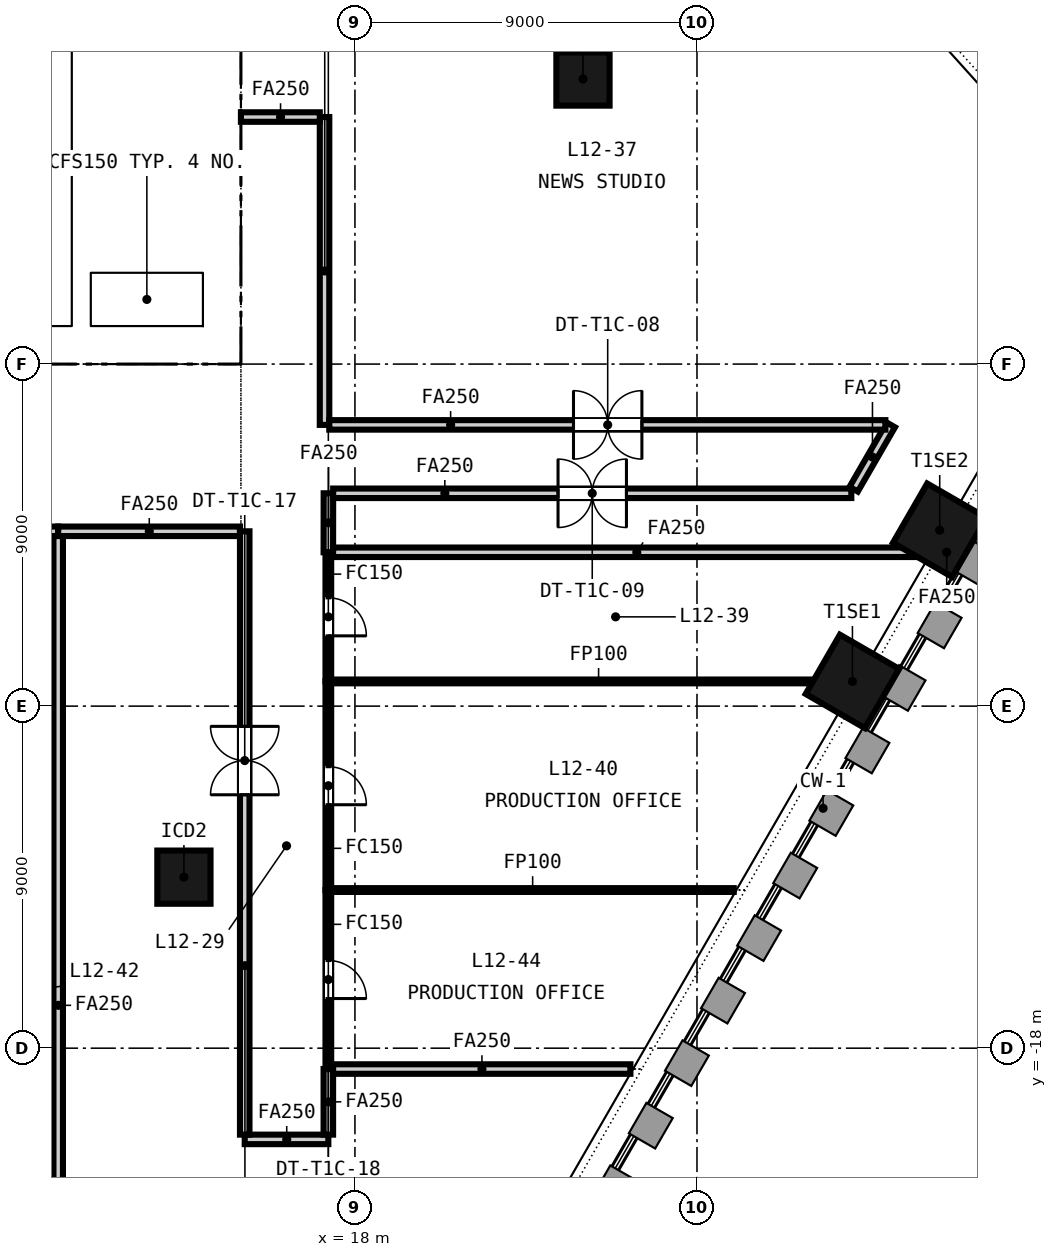
"""IFC4 building model, lengths in metres.
Left out: names, types, materials, properties, quantities, classifications, styles, units other than length and angle.
Written with IfcOpenShell. Run it as: python <this file> out.ifc"""

import sys

from ifc_helpers import new_model, si_unit, direction, frame, frame_2d, origin, origin_2d, place, context, subcontext, project, spatial, rectangle, extrude, element, fill, save


model = new_model("IFC4")
c1 = context("Model", 3, precision=1e-05, world=origin(), true_north=direction((0.0, 1.0)))
c2 = subcontext(c1, "Body", "Model", "MODEL_VIEW")
j1 = project(units=[si_unit("LENGTHUNIT", "METRE"), si_unit("PLANEANGLEUNIT", "RADIAN")], contexts=[c1])
p1 = place(None, origin())
s1 = spatial("IfcSite", under=j1, at=p1, CompositionType="ELEMENT")
p2 = place(p1, origin())
s2 = spatial("IfcBuilding", under=s1, at=p2, CompositionType="ELEMENT")
p3 = place(p2, frame((0.0, 0.0, 57.9)))
s3 = spatial("IfcBuildingStorey", under=s2, at=p3, CompositionType="ELEMENT", Elevation=57.9)
p4 = place(p3, frame((-15.0, 0.5, -0.15), z_axis=(0.0, 0.0, 1.0), x_axis=(1.0, 0.0, 0.0)))
e1 = element("IfcWall", 1, at=p4, inside=s3, PredefinedType="SOLIDWALL", context=c2, shape_type="SweptSolid", body=[
    extrude(rectangle(XDim=30.0, YDim=1.0, at=frame_2d((15.0, 0.0))), origin(), (0.0, 0.0, 1.0), 3.65),
])
p5 = place(p4, frame((5.8, 0.0, 0.15)))
e2 = element("IfcOpeningElement", 2, at=p5, cuts=e1, PredefinedType="OPENING", context=c2, shape_type="SweptSolid", body=[
    extrude(rectangle(XDim=2.4, YDim=2.4, at=frame_2d((1.2, 1.2))), frame((0.0, 0.51, 0.0), z_axis=(0.0, -1.0, 0.0), x_axis=(1.0, 0.0, 0.0)), (0.0, 0.0, 1.0), 1.02),
])
p6 = place(p4, frame((13.8, 0.0, 0.15)))
e3 = element("IfcOpeningElement", 3, at=p6, cuts=e1, PredefinedType="OPENING", context=c2, shape_type="SweptSolid", body=[
    extrude(rectangle(XDim=2.4, YDim=2.4, at=frame_2d((1.2, 1.2))), frame((0.0, 0.51, 0.0), z_axis=(0.0, -1.0, 0.0), x_axis=(1.0, 0.0, 0.0)), (0.0, 0.0, 1.0), 1.02),
])
p7 = place(p4, frame((21.8, 0.0, 0.15)))
e4 = element("IfcOpeningElement", 4, at=p7, cuts=e1, PredefinedType="OPENING", context=c2, shape_type="SweptSolid", body=[
    extrude(rectangle(XDim=2.4, YDim=2.4, at=frame_2d((1.2, 1.2))), frame((0.0, 0.51, 0.0), z_axis=(0.0, -1.0, 0.0), x_axis=(1.0, 0.0, 0.0)), (0.0, 0.0, 1.0), 1.02),
])
p8 = place(p4, frame((1.5, 0.0, 0.15)))
e5 = element("IfcOpeningElement", 5, at=p8, cuts=e1, PredefinedType="OPENING", context=c2, shape_type="SweptSolid", body=[
    extrude(rectangle(XDim=1.2, YDim=2.1, at=frame_2d((0.6, 1.05))), frame((0.0, 0.51, 0.0), z_axis=(0.0, -1.0, 0.0), x_axis=(1.0, 0.0, 0.0)), (0.0, 0.0, 1.0), 1.02),
])
p9 = place(p4, frame((27.3, 0.0, 0.15)))
e6 = element("IfcOpeningElement", 6, at=p9, cuts=e1, PredefinedType="OPENING", context=c2, shape_type="SweptSolid", body=[
    extrude(rectangle(XDim=1.2, YDim=2.1, at=frame_2d((0.6, 1.05))), frame((0.0, 0.51, 0.0), z_axis=(0.0, -1.0, 0.0), x_axis=(1.0, 0.0, 0.0)), (0.0, 0.0, 1.0), 1.02),
])
p10 = place(p3, frame((14.5, 1.0, -0.15), z_axis=(0.0, 0.0, 1.0), x_axis=(0.0, 1.0, 0.0)))
e7 = element("IfcWall", 7, at=p10, inside=s3, PredefinedType="SOLIDWALL", context=c2, shape_type="SweptSolid", body=[
    extrude(rectangle(XDim=13.0, YDim=1.0, at=frame_2d((6.5, 0.0))), origin(), (0.0, 0.0, 1.0), 3.65),
])
p11 = place(p3, frame((10.8, 1.0, -0.15), z_axis=(0.0, 0.0, 1.0), x_axis=(0.0, 1.0, 0.0)))
e8 = element("IfcWall", 8, at=p11, inside=s3, PredefinedType="SOLIDWALL", context=c2, shape_type="SweptSolid", body=[
    extrude(rectangle(XDim=13.0, YDim=0.5, at=frame_2d((6.5, 0.0))), origin(), (0.0, 0.0, 1.0), 3.65),
])
for number, where, z_axis, x_axis in (
    (9, (31.09, -8.35, -0.15), (0.0, 0.0, 1.0), (0.5, 0.866, 0.0)),
    (10, (33.387, -4.373, -0.15), (0.0, 0.0, 1.0), (0.5, 0.866, 0.0)),
):
    element("IfcColumn", number, at=place(p3, frame(where, z_axis=z_axis, x_axis=x_axis)), inside=s3, PredefinedType="COLUMN", context=c2, shape_type="SweptSolid", body=[
        extrude(rectangle(XDim=1.8, YDim=1.8, at=origin_2d()), origin(), (0.0, 0.0, 1.0), 3.65),
    ])
for number, where, z_axis, x_axis in (
    (11, (13.5, -13.5, -0.15), (0.0, 0.0, 1.0), (1.0, 0.0, 0.0)),
    (12, (24.0, 7.5, -0.15), (0.0, 0.0, 1.0), (1.0, 0.0, 0.0)),
):
    element("IfcColumn", number, at=place(p3, frame(where, z_axis=z_axis, x_axis=x_axis)), inside=s3, PredefinedType="COLUMN", context=c2, shape_type="SweptSolid", body=[
        extrude(rectangle(XDim=1.4, YDim=1.4, at=origin_2d()), origin(), (0.0, 0.0, 1.0), 3.65),
    ])
p12 = place(p3, frame((-10.55, 3.5, 0.0), z_axis=(0.0, 0.0, 1.0), x_axis=(1.0, 0.0, 0.0)))
e13 = element("IfcWall", 13, at=p12, inside=s3, PredefinedType="PARTITIONING", context=c2, shape_type="SweptSolid", body=[
    extrude(rectangle(XDim=21.1, YDim=0.2, at=frame_2d((10.55, 0.0))), origin(), (0.0, 0.0, 1.0), 3.5),
])
p13 = place(p12, frame((0.675, 0.0, 0.0)))
e14 = element("IfcOpeningElement", 14, at=p13, cuts=e13, PredefinedType="OPENING", context=c2, shape_type="SweptSolid", body=[
    extrude(rectangle(XDim=1.2, YDim=2.1, at=frame_2d((0.6, 1.05))), frame((0.0, 0.11, 0.0), z_axis=(0.0, -1.0, 0.0), x_axis=(1.0, 0.0, 0.0)), (0.0, 0.0, 1.0), 0.22),
])
p14 = place(p12, frame((3.475, 0.0, 0.0)))
e15 = element("IfcOpeningElement", 15, at=p14, cuts=e13, PredefinedType="OPENING", context=c2, shape_type="SweptSolid", body=[
    extrude(rectangle(XDim=1.2, YDim=2.1, at=frame_2d((0.6, 1.05))), frame((0.0, 0.11, 0.0), z_axis=(0.0, -1.0, 0.0), x_axis=(1.0, 0.0, 0.0)), (0.0, 0.0, 1.0), 0.22),
])
p15 = place(p12, frame((6.275, 0.0, 0.0)))
e16 = element("IfcOpeningElement", 16, at=p15, cuts=e13, PredefinedType="OPENING", context=c2, shape_type="SweptSolid", body=[
    extrude(rectangle(XDim=1.2, YDim=2.1, at=frame_2d((0.6, 1.05))), frame((0.0, 0.11, 0.0), z_axis=(0.0, -1.0, 0.0), x_axis=(1.0, 0.0, 0.0)), (0.0, 0.0, 1.0), 0.22),
])
p16 = place(p12, frame((9.075, 0.0, 0.0)))
e17 = element("IfcOpeningElement", 17, at=p16, cuts=e13, PredefinedType="OPENING", context=c2, shape_type="SweptSolid", body=[
    extrude(rectangle(XDim=1.2, YDim=2.1, at=frame_2d((0.6, 1.05))), frame((0.0, 0.11, 0.0), z_axis=(0.0, -1.0, 0.0), x_axis=(1.0, 0.0, 0.0)), (0.0, 0.0, 1.0), 0.22),
])
p17 = place(p12, frame((11.875, 0.0, 0.0)))
e18 = element("IfcOpeningElement", 18, at=p17, cuts=e13, PredefinedType="OPENING", context=c2, shape_type="SweptSolid", body=[
    extrude(rectangle(XDim=1.2, YDim=2.1, at=frame_2d((0.6, 1.05))), frame((0.0, 0.11, 0.0), z_axis=(0.0, -1.0, 0.0), x_axis=(1.0, 0.0, 0.0)), (0.0, 0.0, 1.0), 0.22),
])
p18 = place(p12, frame((14.675, 0.0, 0.0)))
e19 = element("IfcOpeningElement", 19, at=p18, cuts=e13, PredefinedType="OPENING", context=c2, shape_type="SweptSolid", body=[
    extrude(rectangle(XDim=1.2, YDim=2.1, at=frame_2d((0.6, 1.05))), frame((0.0, 0.11, 0.0), z_axis=(0.0, -1.0, 0.0), x_axis=(1.0, 0.0, 0.0)), (0.0, 0.0, 1.0), 0.22),
])
p19 = place(p12, frame((17.475, 0.0, 0.0)))
e20 = element("IfcOpeningElement", 20, at=p19, cuts=e13, PredefinedType="OPENING", context=c2, shape_type="SweptSolid", body=[
    extrude(rectangle(XDim=1.2, YDim=2.1, at=frame_2d((0.6, 1.05))), frame((0.0, 0.11, 0.0), z_axis=(0.0, -1.0, 0.0), x_axis=(1.0, 0.0, 0.0)), (0.0, 0.0, 1.0), 0.22),
])
p20 = place(p12, frame((19.9, 0.0, 0.0)))
e21 = element("IfcOpeningElement", 21, at=p20, cuts=e13, PredefinedType="OPENING", context=c2, shape_type="SweptSolid", body=[
    extrude(rectangle(XDim=0.9, YDim=2.1, at=frame_2d((0.45, 1.05))), frame((0.0, 0.11, 0.0), z_axis=(0.0, -1.0, 0.0), x_axis=(1.0, 0.0, 0.0)), (0.0, 0.0, 1.0), 0.22),
])
p21 = place(p3, frame((-10.55, 6.025, 0.0), z_axis=(0.0, 0.0, 1.0), x_axis=(1.0, 0.0, 0.0)))
e22 = element("IfcWall", 22, at=p21, inside=s3, PredefinedType="PARTITIONING", context=c2, shape_type="SweptSolid", body=[
    extrude(rectangle(XDim=21.1, YDim=0.25, at=frame_2d((10.55, 0.0))), origin(), (0.0, 0.0, 1.0), 3.5),
])
p22 = place(p3, frame((11.05, 7.35, -0.15), z_axis=(0.0, 0.0, 1.0), x_axis=(1.0, 0.0, 0.0)))
e23 = element("IfcWall", 23, at=p22, inside=s3, PredefinedType="SOLIDWALL", context=c2, shape_type="SweptSolid", body=[
    extrude(rectangle(XDim=2.95, YDim=0.3, at=frame_2d((1.475, 0.0))), origin(), (0.0, 0.0, 1.0), 3.65),
])
p23 = place(p3, frame((10.192, -4.4, 0.0), z_axis=(0.0, 0.0, 1.0), x_axis=(-1.0, 0.0, 0.0)))
e24 = element("IfcWall", 24, at=p23, inside=s3, PredefinedType="PARTITIONING", context=c2, shape_type="SweptSolid", body=[
    extrude(rectangle(XDim=14.447, YDim=0.25, at=frame_2d((7.223, 0.0))), origin(), (0.0, 0.0, 1.0), 2.741),
])
p24 = place(p23, frame((6.323, 0.0, 0.0)))
e25 = element("IfcOpeningElement", 25, at=p24, cuts=e24, PredefinedType="OPENING", context=c2, shape_type="SweptSolid", body=[
    extrude(rectangle(XDim=1.8, YDim=2.1, at=frame_2d((0.9, 1.05))), frame((0.0, 0.135, 0.0), z_axis=(0.0, -1.0, 0.0), x_axis=(1.0, 0.0, 0.0)), (0.0, 0.0, 1.0), 0.27),
])
p25 = place(p3, frame((14.975, -4.4, 0.0), z_axis=(0.0, 0.0, 1.0), x_axis=(-1.0, 0.0, 0.0)))
e26 = element("IfcWall", 26, at=p25, inside=s3, PredefinedType="PARTITIONING", context=c2, shape_type="SweptSolid", body=[
    extrude(rectangle(XDim=4.783, YDim=0.25, at=frame_2d((2.392, 0.0))), origin(), (0.0, 0.0, 1.0), 2.741),
])
p26 = place(p3, frame((17.2, 6.5, 0.0), z_axis=(0.0, 0.0, 1.0), x_axis=(0.0, -1.0, 0.0)))
e27 = element("IfcWall", 27, at=p26, inside=s3, PredefinedType="PARTITIONING", context=c2, shape_type="SweptSolid", body=[
    extrude(rectangle(XDim=8.1, YDim=0.25, at=frame_2d((4.05, 0.0))), origin(), (0.0, 0.0, 1.0), 2.741),
])
p27 = place(p3, frame((17.302, -3.4, 0.0), z_axis=(0.0, 0.0, 1.0), x_axis=(-0.00125845425, -0.999999208146, 0.0)))
e28 = element("IfcWall", 28, at=p27, inside=s3, PredefinedType="PARTITIONING", context=c2, shape_type="SweptSolid", body=[
    extrude(rectangle(XDim=1.552, YDim=0.25, at=frame_2d((0.776, 0.0))), origin(), (0.0, 0.0, 1.0), 2.741),
])
p28 = place(p3, frame((31.061, -3.4, 0.0), z_axis=(0.0, 0.0, 1.0), x_axis=(-1.0, 0.0, 0.0)))
e29 = element("IfcWall", 29, at=p28, inside=s3, PredefinedType="PARTITIONING", context=c2, shape_type="SweptSolid", body=[
    extrude(rectangle(XDim=13.634, YDim=0.25, at=frame_2d((6.817, 0.0))), origin(), (0.0, 0.0, 1.0), 2.741),
])
p29 = place(p28, frame((5.917, 0.0, 0.0)))
e30 = element("IfcOpeningElement", 30, at=p29, cuts=e29, PredefinedType="OPENING", context=c2, shape_type="SweptSolid", body=[
    extrude(rectangle(XDim=1.8, YDim=2.1, at=frame_2d((0.9, 1.05))), frame((0.0, 0.135, 0.0), z_axis=(0.0, -1.0, 0.0), x_axis=(1.0, 0.0, 0.0)), (0.0, 0.0, 1.0), 0.27),
])
p30 = place(p3, frame((32.101, -1.6, 0.0), z_axis=(0.0, 0.0, 1.0), x_axis=(-0.500331725305, -0.865833797362, 0.0)))
e31 = element("IfcWall", 31, at=p30, inside=s3, PredefinedType="PARTITIONING", context=c2, shape_type="SweptSolid", body=[
    extrude(rectangle(XDim=1.954, YDim=0.25, at=frame_2d((0.977, 0.0))), origin(), (0.0, 0.0, 1.0), 2.741),
])
p31 = place(p3, frame((17.3, -4.952, 0.0), z_axis=(0.0, 0.0, 1.0), x_axis=(0.0, -1.0, 0.0)))
e32 = element("IfcWall", 32, at=p31, inside=s3, PredefinedType="PARTITIONING", context=c2, shape_type="SweptSolid", body=[
    extrude(rectangle(XDim=3.398, YDim=0.15, at=frame_2d((1.699, 0.0))), origin(), (0.0, 0.0, 1.0), 2.741),
])
p32 = place(p31, frame((1.199, 0.0, 0.0)))
e33 = element("IfcOpeningElement", 33, at=p32, cuts=e32, PredefinedType="OPENING", context=c2, shape_type="SweptSolid", body=[
    extrude(rectangle(XDim=1.0, YDim=2.1, at=frame_2d((0.5, 1.05))), frame((0.0, 0.085, 0.0), z_axis=(0.0, -1.0, 0.0), x_axis=(1.0, 0.0, 0.0)), (0.0, 0.0, 1.0), 0.17),
])
p33 = place(p3, frame((17.3, -8.35, 0.0), z_axis=(0.0, 0.0, 1.0), x_axis=(0.0, -1.0, 0.0)))
e34 = element("IfcWall", 34, at=p33, inside=s3, PredefinedType="PARTITIONING", context=c2, shape_type="SweptSolid", body=[
    extrude(rectangle(XDim=5.489, YDim=0.15, at=frame_2d((2.745, 0.0))), origin(), (0.0, 0.0, 1.0), 2.741),
])
p34 = place(p33, frame((2.244, 0.0, 0.0)))
e35 = element("IfcOpeningElement", 35, at=p34, cuts=e34, PredefinedType="OPENING", context=c2, shape_type="SweptSolid", body=[
    extrude(rectangle(XDim=1.0, YDim=2.1, at=frame_2d((0.5, 1.05))), frame((0.0, 0.085, 0.0), z_axis=(0.0, -1.0, 0.0), x_axis=(1.0, 0.0, 0.0)), (0.0, 0.0, 1.0), 0.17),
])
p35 = place(p3, frame((17.3, -20.4, 0.0), z_axis=(0.0, 0.0, 1.0), x_axis=(-1.0, 0.0, 0.0)))
e36 = element("IfcWall", 36, at=p35, inside=s3, PredefinedType="PARTITIONING", context=c2, shape_type="SweptSolid", body=[
    extrude(rectangle(XDim=2.2, YDim=0.25, at=frame_2d((1.1, 0.0))), origin(), (0.0, 0.0, 1.0), 2.741),
])
p36 = place(p3, frame((17.3, -18.549, 0.0), z_axis=(0.0, 0.0, 1.0), x_axis=(0.0, -1.0, 0.0)))
e37 = element("IfcWall", 37, at=p36, inside=s3, PredefinedType="PARTITIONING", context=c2, shape_type="SweptSolid", body=[
    extrude(rectangle(XDim=1.726, YDim=0.25, at=frame_2d((0.863, 0.0))), origin(), (0.0, 0.0, 1.0), 2.741),
])
p37 = place(p3, frame((17.3, -13.839, 0.0), z_axis=(0.0, 0.0, 1.0), x_axis=(0.0, -1.0, 0.0)))
e38 = element("IfcWall", 38, at=p37, inside=s3, PredefinedType="PARTITIONING", context=c2, shape_type="SweptSolid", body=[
    extrude(rectangle(XDim=4.71, YDim=0.15, at=frame_2d((2.355, 0.0))), origin(), (0.0, 0.0, 1.0), 2.741),
])
p38 = place(p37, frame((1.855, 0.0, 0.0)))
e39 = element("IfcOpeningElement", 39, at=p38, cuts=e38, PredefinedType="OPENING", context=c2, shape_type="SweptSolid", body=[
    extrude(rectangle(XDim=1.0, YDim=2.1, at=frame_2d((0.5, 1.05))), frame((0.0, 0.085, 0.0), z_axis=(0.0, -1.0, 0.0), x_axis=(1.0, 0.0, 0.0)), (0.0, 0.0, 1.0), 0.17),
])
p39 = place(p3, frame((15.0, 6.5, 0.0), z_axis=(0.0, 0.0, 1.0), x_axis=(1.0, 0.0, 0.0)))
e40 = element("IfcWall", 40, at=p39, inside=s3, PredefinedType="PARTITIONING", context=c2, shape_type="SweptSolid", body=[
    extrude(rectangle(XDim=2.075, YDim=0.25, at=frame_2d((1.038, 0.0))), origin(), (0.0, 0.0, 1.0), 2.741),
])
p40 = place(p3, frame((17.325, -1.6, 0.0), z_axis=(0.0, 0.0, 1.0), x_axis=(1.0, 0.0, 0.0)))
e41 = element("IfcWall", 41, at=p40, inside=s3, PredefinedType="PARTITIONING", context=c2, shape_type="SweptSolid", body=[
    extrude(rectangle(XDim=14.632, YDim=0.25, at=frame_2d((7.316, 0.0))), origin(), (0.0, 0.0, 1.0), 2.741),
])
p41 = place(p40, frame((6.426, 0.0, 0.0)))
e42 = element("IfcOpeningElement", 42, at=p41, cuts=e41, PredefinedType="OPENING", context=c2, shape_type="SweptSolid", body=[
    extrude(rectangle(XDim=1.8, YDim=2.1, at=frame_2d((0.9, 1.05))), frame((0.0, 0.135, 0.0), z_axis=(0.0, -1.0, 0.0), x_axis=(1.0, 0.0, 0.0)), (0.0, 0.0, 1.0), 0.27),
])
p42 = place(p3, frame((33.398, -4.952, 0.0), z_axis=(0.0, 0.0, 1.0), x_axis=(-1.0, 0.0, 0.0)))
e43 = element("IfcWall", 43, at=p42, inside=s3, PredefinedType="PARTITIONING", context=c2, shape_type="SweptSolid", body=[
    extrude(rectangle(XDim=15.973, YDim=0.25, at=frame_2d((7.986, 0.0))), origin(), (0.0, 0.0, 1.0), 2.741),
])
p43 = place(p3, frame((33.398, -4.95, 0.0), z_axis=(0.0, 0.0, 1.0), x_axis=(1.0, 0.0, 0.0)))
e44 = element("IfcWall", 44, at=p43, inside=s3, PredefinedType="PARTITIONING", context=c2, shape_type="SweptSolid", body=[
    extrude(rectangle(XDim=0.335, YDim=0.25, at=frame_2d((0.167, 0.0))), origin(), (0.0, 0.0, 1.0), 2.741),
])
p44 = place(p3, frame((17.375, -8.35, 0.0), z_axis=(0.0, 0.0, 1.0), x_axis=(1.0, 0.0, 0.0)))
e45 = element("IfcWall", 45, at=p44, inside=s3, PredefinedType="PARTITIONING", context=c2, shape_type="SweptSolid", body=[
    extrude(rectangle(XDim=14.062, YDim=0.1, at=frame_2d((7.031, 0.0))), origin(), (0.0, 0.0, 1.0), 2.741),
])
p45 = place(p3, frame((17.375, -13.839, 0.0), z_axis=(0.0, 0.0, 1.0), x_axis=(1.0, 0.0, 0.0)))
e46 = element("IfcWall", 46, at=p45, inside=s3, PredefinedType="PARTITIONING", context=c2, shape_type="SweptSolid", body=[
    extrude(rectangle(XDim=10.592, YDim=0.1, at=frame_2d((5.296, 0.0))), origin(), (0.0, 0.0, 1.0), 2.741),
])
p46 = place(p3, frame((10.192, -29.22, 0.0), z_axis=(0.0, 0.0, 1.0), x_axis=(0.0, 1.0, 0.0)))
e47 = element("IfcWall", 47, at=p46, inside=s3, PredefinedType="PARTITIONING", context=c2, shape_type="SweptSolid", body=[
    extrude(rectangle(XDim=24.695, YDim=0.25, at=frame_2d((12.348, 0.0))), origin(), (0.0, 0.0, 1.0), 2.741),
])
p47 = place(p3, frame((15.1, -20.275, 0.0), z_axis=(0.0, 0.0, 1.0), x_axis=(0.0, 1.0, 0.0)))
e48 = element("IfcWall", 48, at=p47, inside=s3, PredefinedType="PARTITIONING", context=c2, shape_type="SweptSolid", body=[
    extrude(rectangle(XDim=15.875, YDim=0.25, at=frame_2d((7.938, 0.0))), origin(), (0.0, 0.0, 1.0), 2.741),
])
p48 = place(p47, frame((8.942, 0.0, 0.0)))
e49 = element("IfcOpeningElement", 49, at=p48, cuts=e48, PredefinedType="OPENING", context=c2, shape_type="SweptSolid", body=[
    extrude(rectangle(XDim=1.8, YDim=2.1, at=frame_2d((0.9, 1.05))), frame((0.0, 0.135, 0.0), z_axis=(0.0, -1.0, 0.0), x_axis=(1.0, 0.0, 0.0)), (0.0, 0.0, 1.0), 0.27),
])
p49 = place(p3, frame((17.425, -18.549, 0.0), z_axis=(0.0, 0.0, 1.0), x_axis=(1.0, 0.0, 0.0)))
e50 = element("IfcWall", 50, at=p49, inside=s3, PredefinedType="PARTITIONING", context=c2, shape_type="SweptSolid", body=[
    extrude(rectangle(XDim=7.823, YDim=0.25, at=frame_2d((3.912, 0.0))), origin(), (0.0, 0.0, 1.0), 2.741),
])
p50 = place(p20, origin())
e51 = element("IfcDoor", 51, at=p50, inside=s3, OperationType="SINGLE_SWING_RIGHT", PredefinedType="DOOR", context=c2, shape_type="SweptSolid", body=[
    extrude(rectangle(XDim=0.9, YDim=2.1, at=frame_2d((0.45, 1.05))), frame((0.0, 0.025, 0.0), z_axis=(0.0, -1.0, 0.0), x_axis=(1.0, 0.0, 0.0)), (0.0, 0.0, 1.0), 0.05),
])
fill(e21, e51)
p51 = place(p9, origin())
e52 = element("IfcDoor", 52, at=p51, inside=s3, OperationType="SINGLE_SWING_RIGHT", PredefinedType="DOOR", context=c2, shape_type="SweptSolid", body=[
    extrude(rectangle(XDim=1.2, YDim=2.1, at=frame_2d((0.6, 1.05))), frame((0.0, 0.025, 0.0), z_axis=(0.0, -1.0, 0.0), x_axis=(1.0, 0.0, 0.0)), (0.0, 0.0, 1.0), 0.05),
])
fill(e6, e52)
p52 = place(p41, origin())
e53 = element("IfcDoor", 53, at=p52, inside=s3, OperationType="DOUBLE_DOOR_DOUBLE_SWING", PredefinedType="DOOR", context=c2, shape_type="SweptSolid", body=[
    extrude(rectangle(XDim=1.8, YDim=2.1, at=frame_2d((0.9, 1.05))), frame((0.0, 0.025, 0.0), z_axis=(0.0, -1.0, 0.0), x_axis=(1.0, 0.0, 0.0)), (0.0, 0.0, 1.0), 0.05),
])
fill(e42, e53)
p53 = place(p29, origin())
e54 = element("IfcDoor", 54, at=p53, inside=s3, OperationType="DOUBLE_DOOR_DOUBLE_SWING", PredefinedType="DOOR", context=c2, shape_type="SweptSolid", body=[
    extrude(rectangle(XDim=1.8, YDim=2.1, at=frame_2d((0.9, 1.05))), frame((0.0, 0.025, 0.0), z_axis=(0.0, -1.0, 0.0), x_axis=(1.0, 0.0, 0.0)), (0.0, 0.0, 1.0), 0.05),
])
fill(e30, e54)
p54 = place(p32, origin())
e55 = element("IfcDoor", 55, at=p54, inside=s3, OperationType="SINGLE_SWING_RIGHT", PredefinedType="DOOR", context=c2, shape_type="SweptSolid", body=[
    extrude(rectangle(XDim=1.0, YDim=2.1, at=frame_2d((0.5, 1.05))), frame((0.0, 0.025, 0.0), z_axis=(0.0, -1.0, 0.0), x_axis=(1.0, 0.0, 0.0)), (0.0, 0.0, 1.0), 0.05),
])
fill(e33, e55)
p55 = place(p34, origin())
e56 = element("IfcDoor", 56, at=p55, inside=s3, OperationType="SINGLE_SWING_RIGHT", PredefinedType="DOOR", context=c2, shape_type="SweptSolid", body=[
    extrude(rectangle(XDim=1.0, YDim=2.1, at=frame_2d((0.5, 1.05))), frame((0.0, 0.025, 0.0), z_axis=(0.0, -1.0, 0.0), x_axis=(1.0, 0.0, 0.0)), (0.0, 0.0, 1.0), 0.05),
])
fill(e35, e56)
p56 = place(p48, origin())
e57 = element("IfcDoor", 57, at=p56, inside=s3, OperationType="DOUBLE_DOOR_DOUBLE_SWING", PredefinedType="DOOR", context=c2, shape_type="SweptSolid", body=[
    extrude(rectangle(XDim=1.8, YDim=2.1, at=frame_2d((0.9, 1.05))), frame((0.0, 0.025, 0.0), z_axis=(0.0, -1.0, 0.0), x_axis=(1.0, 0.0, 0.0)), (0.0, 0.0, 1.0), 0.05),
])
fill(e49, e57)
p57 = place(p38, origin())
e58 = element("IfcDoor", 58, at=p57, inside=s3, OperationType="SINGLE_SWING_RIGHT", PredefinedType="DOOR", context=c2, shape_type="SweptSolid", body=[
    extrude(rectangle(XDim=1.0, YDim=2.1, at=frame_2d((0.5, 1.05))), frame((0.0, 0.025, 0.0), z_axis=(0.0, -1.0, 0.0), x_axis=(1.0, 0.0, 0.0)), (0.0, 0.0, 1.0), 0.05),
])
fill(e39, e58)
save(model, sys.argv[1])
